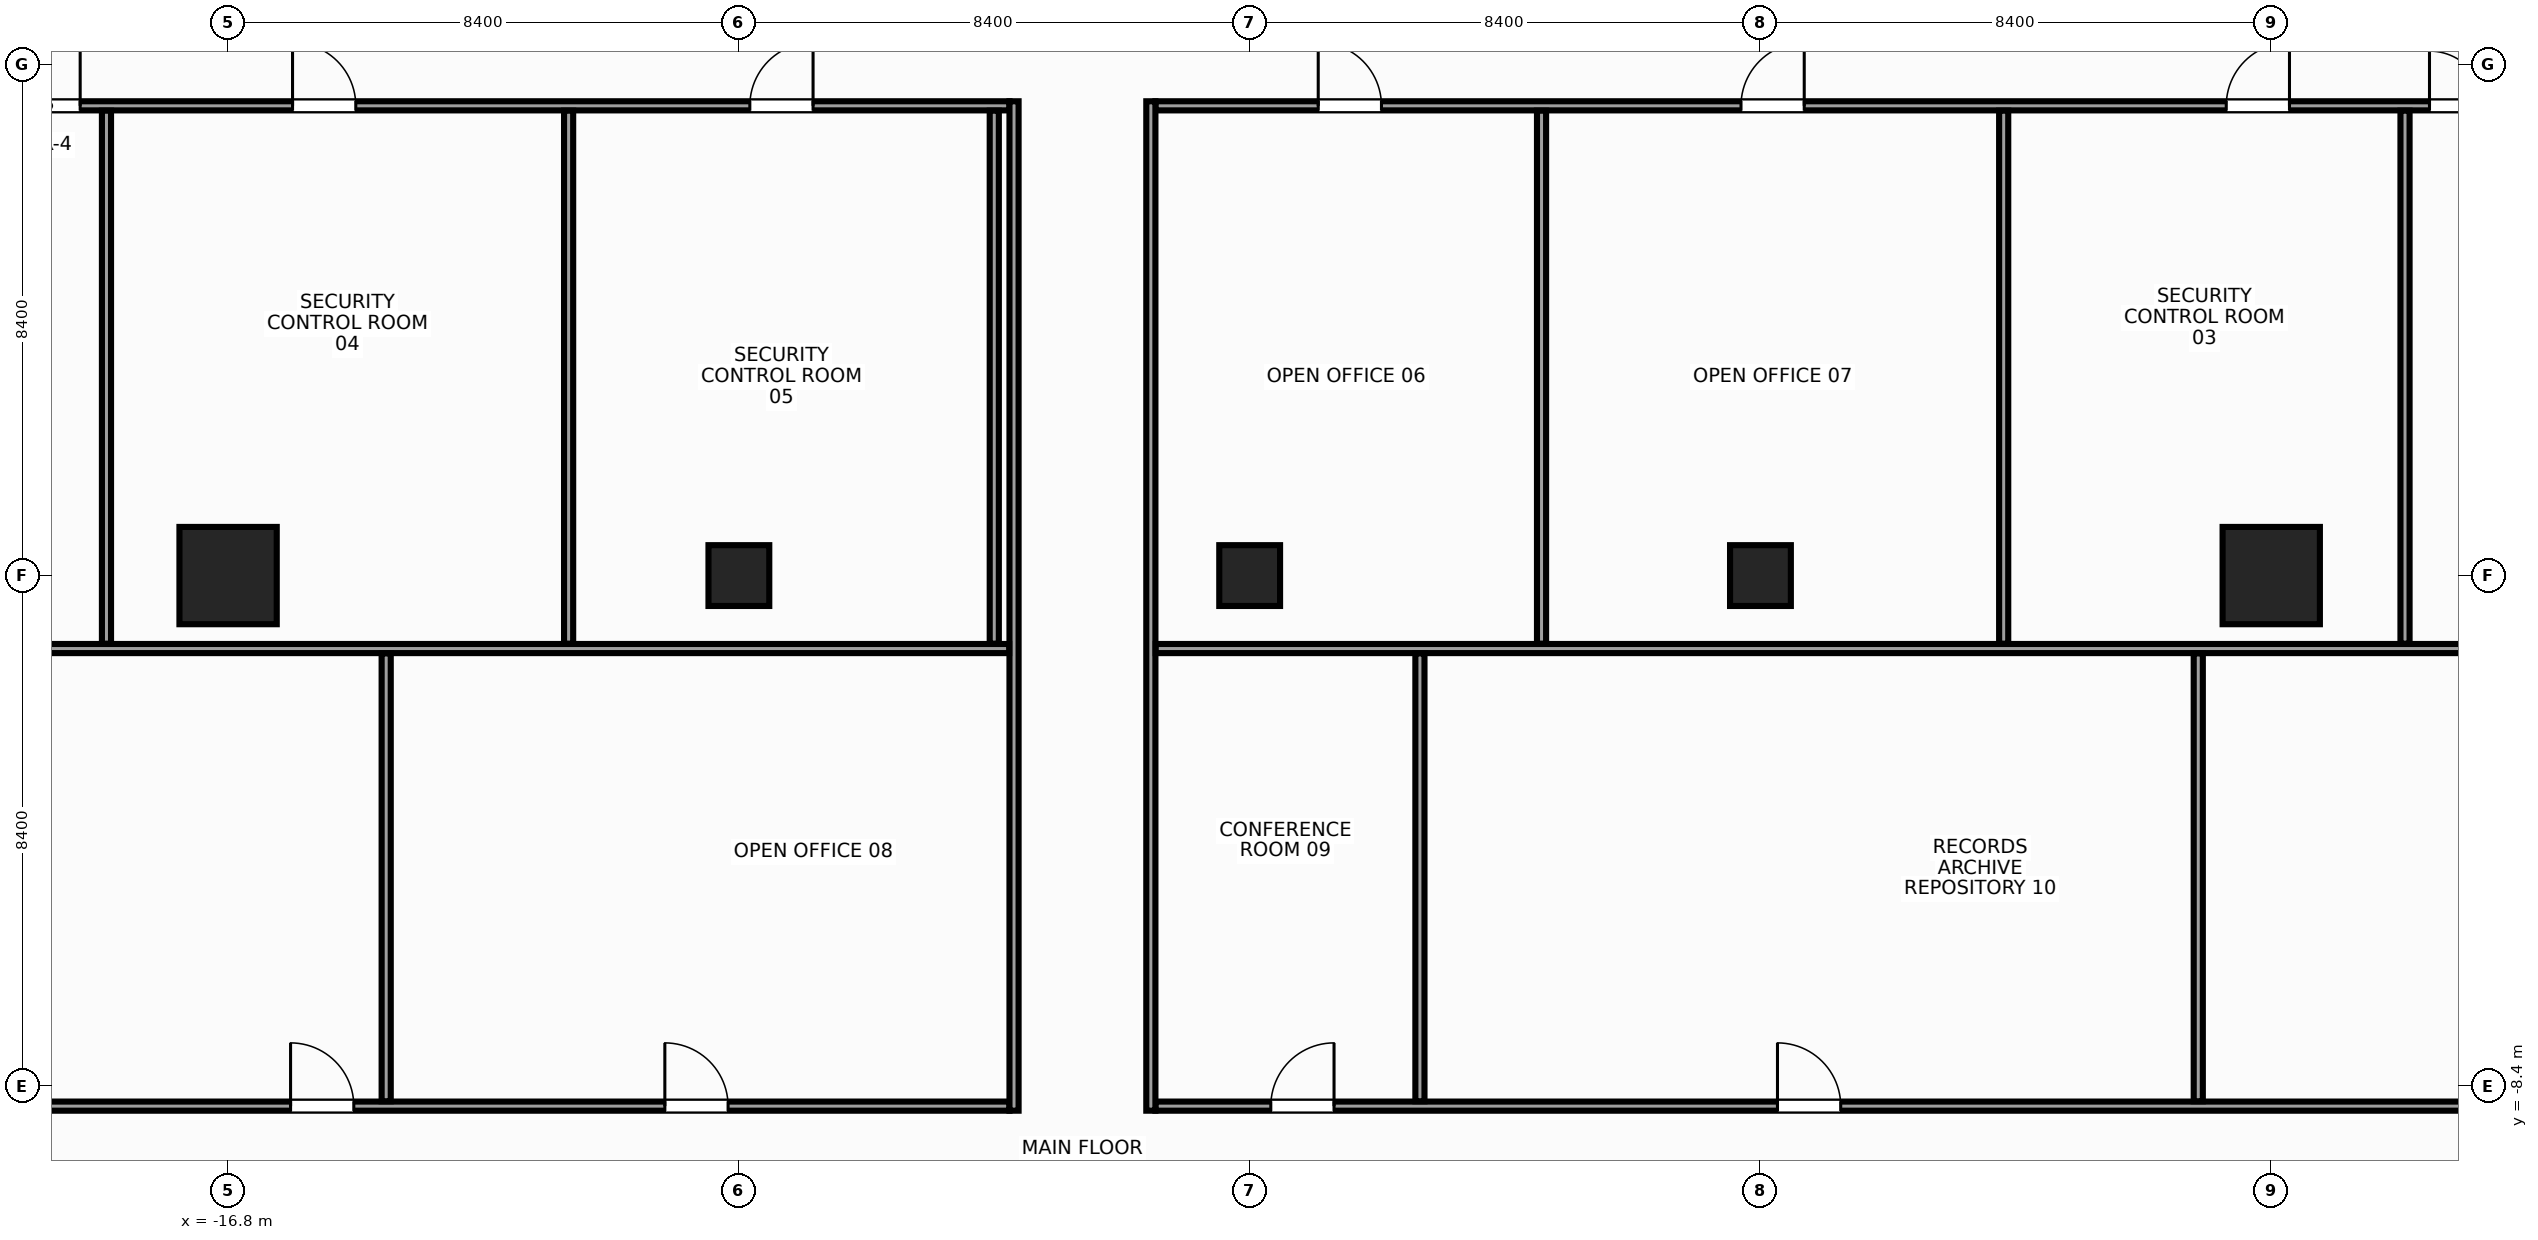
"""IFC4 building model, lengths in metres.
Left out: names, types, materials, properties, quantities, classifications, styles, units other than length and angle.
Written with IfcOpenShell. Run it as: python <this file> out.ifc"""

import sys

from ifc_helpers import new_model, si_unit, direction, frame, frame_2d, origin, origin_with_axes, origin_2d, place, context, subcontext, project, spatial, rectangle, hollow_rectangle, extrude, source, transform, mapped, element, fill, save


model = new_model("IFC4")
c1 = context("Model", 3, precision=1e-05, world=origin(), true_north=direction((0.0, 1.0)))
c2 = subcontext(c1, "Body", "Model", "MODEL_VIEW")
j1 = project(units=[si_unit("LENGTHUNIT", "METRE"), si_unit("PLANEANGLEUNIT", "RADIAN")], contexts=[c1])
p1 = place(None, origin())
s1 = spatial("IfcSite", under=j1, at=p1, CompositionType="ELEMENT")
p2 = place(p1, origin())
s2 = spatial("IfcBuilding", under=s1, at=p2, CompositionType="ELEMENT")
p3 = place(p2, frame((0.0, 0.0, 92.0)))
s3 = spatial("IfcBuildingStorey", under=s2, at=p3, CompositionType="ELEMENT", Elevation=92.0)
m1 = source(origin(), c2, "Body", "SweptSolid", [
    extrude(rectangle(XDim=1.6, YDim=1.6, at=origin_2d()), origin(), (0.0, 0.0, 1.0), 3.6),
])
for number, where, z_axis, x_axis in (
    (1, (-16.8, 0.0, 0.0), (0.0, 0.0, 1.0), (1.0, 0.0, 0.0)),
    (2, (16.8, 0.0, 0.0), (0.0, 0.0, 1.0), (1.0, 0.0, 0.0)),
):
    element("IfcColumn", number, at=place(p3, frame(where, z_axis=z_axis, x_axis=x_axis)), inside=s3, PredefinedType="COLUMN", context=c2, shape_type="MappedRepresentation", body=[
        mapped(m1, transform((0.0, 0.0, 0.0), x_axis=(1.0, 0.0, 0.0), y_axis=(0.0, 1.0, 0.0), z_axis=(0.0, 0.0, 1.0), scale=1.0)),
    ])
m2 = source(origin(), c2, "Body", "SweptSolid", [
    extrude(hollow_rectangle(XDim=1.0, YDim=1.0, WallThickness=0.045, at=origin_2d()), origin(), (0.0, 0.0, 1.0), 3.6),
])
for number, where, z_axis, x_axis in (
    (3, (-8.4, 0.0, 0.0), (0.0, 0.0, 1.0), (1.0, 0.0, 0.0)),
    (4, (8.4, 0.0, 0.0), (0.0, 0.0, 1.0), (1.0, 0.0, 0.0)),
):
    element("IfcColumn", number, at=place(p3, frame(where, z_axis=z_axis, x_axis=x_axis)), inside=s3, PredefinedType="COLUMN", context=c2, shape_type="MappedRepresentation", body=[
        mapped(m2, transform((0.0, 0.0, 0.0), x_axis=(1.0, 0.0, 0.0), y_axis=(0.0, 1.0, 0.0), z_axis=(0.0, 0.0, 1.0), scale=1.0)),
    ])
m3 = source(origin(), c2, "Body", "SweptSolid", [
    extrude(rectangle(XDim=1.0, YDim=1.0, at=origin_2d()), origin(), (0.0, 0.0, 1.0), 3.6),
])
p4 = place(p3, origin_with_axes())
e5 = element("IfcColumn", 5, at=p4, inside=s3, PredefinedType="COLUMN", context=c2, shape_type="MappedRepresentation", body=[
    mapped(m3, transform((0.0, 0.0, 0.0), x_axis=(1.0, 0.0, 0.0), y_axis=(0.0, 1.0, 0.0), z_axis=(0.0, 0.0, 1.0), scale=1.0)),
])
m4 = source(origin(), c2, "Body", "SweptSolid", [
    extrude(rectangle(XDim=16.8, YDim=0.15, at=frame_2d((8.4, 0.0))), origin(), (0.0, 0.0, 1.0), 2.745),
])
p5 = place(p3, frame((-20.75, 7.725, 0.0), z_axis=(0.0, 0.0, 1.0), x_axis=(1.0, 0.0, 0.0)))
e6 = element("IfcWall", 6, at=p5, inside=s3, PredefinedType="PARTITIONING", context=c2, shape_type="MappedRepresentation", body=[
    mapped(m4, transform((0.0, 0.0, 0.0), x_axis=(1.0, 0.0, 0.0), y_axis=(0.0, 1.0, 0.0), z_axis=(0.0, 0.0, 1.0), scale=1.0)),
])
p6 = place(p5, frame((0.478, 0.0, 0.0)))
e7 = element("IfcOpeningElement", 7, at=p6, cuts=e6, PredefinedType="OPENING", context=c2, shape_type="SweptSolid", body=[
    extrude(rectangle(XDim=1.04, YDim=2.2, at=frame_2d((0.52, 1.1))), frame((0.0, 0.087, 0.0), z_axis=(0.0, -1.0, 0.0), x_axis=(1.0, 0.0, 0.0)), (0.0, 0.0, 1.0), 0.174),
])
p7 = place(p5, frame((5.01, 0.0, 0.0)))
e8 = element("IfcOpeningElement", 8, at=p7, cuts=e6, PredefinedType="OPENING", context=c2, shape_type="SweptSolid", body=[
    extrude(rectangle(XDim=1.04, YDim=2.2, at=frame_2d((0.52, 1.1))), frame((0.0, 0.087, 0.0), z_axis=(0.0, -1.0, 0.0), x_axis=(1.0, 0.0, 0.0)), (0.0, 0.0, 1.0), 0.174),
])
p8 = place(p5, frame((12.53, 0.0, 0.0)))
e9 = element("IfcOpeningElement", 9, at=p8, cuts=e6, PredefinedType="OPENING", context=c2, shape_type="SweptSolid", body=[
    extrude(rectangle(XDim=1.04, YDim=2.2, at=frame_2d((0.52, 1.1))), frame((0.0, 0.087, 0.0), z_axis=(0.0, -1.0, 0.0), x_axis=(1.0, 0.0, 0.0)), (0.0, 0.0, 1.0), 0.174),
])
m5 = source(origin(), c2, "Body", "SweptSolid", [
    extrude(rectangle(XDim=22.3, YDim=0.15, at=frame_2d((11.15, 0.0))), origin(), (0.0, 0.0, 1.0), 2.745),
])
p9 = place(p3, frame((-1.55, 7.725, 0.0), z_axis=(0.0, 0.0, 1.0), x_axis=(1.0, 0.0, 0.0)))
e10 = element("IfcWall", 10, at=p9, inside=s3, PredefinedType="PARTITIONING", context=c2, shape_type="MappedRepresentation", body=[
    mapped(m5, transform((0.0, 0.0, 0.0), x_axis=(1.0, 0.0, 0.0), y_axis=(0.0, 1.0, 0.0), z_axis=(0.0, 0.0, 1.0), scale=1.0)),
])
p10 = place(p9, frame((20.952, 0.0, 0.0)))
e11 = element("IfcOpeningElement", 11, at=p10, cuts=e10, PredefinedType="OPENING", context=c2, shape_type="SweptSolid", body=[
    extrude(rectangle(XDim=0.9, YDim=2.15, at=frame_2d((0.45, 1.075))), frame((0.0, 0.087, 0.0), z_axis=(0.0, -1.0, 0.0), x_axis=(1.0, 0.0, 0.0)), (0.0, 0.0, 1.0), 0.174),
])
p11 = place(p9, frame((17.61, 0.0, 0.0)))
e12 = element("IfcOpeningElement", 12, at=p11, cuts=e10, PredefinedType="OPENING", context=c2, shape_type="SweptSolid", body=[
    extrude(rectangle(XDim=1.04, YDim=2.2, at=frame_2d((0.52, 1.1))), frame((0.0, 0.087, 0.0), z_axis=(0.0, -1.0, 0.0), x_axis=(1.0, 0.0, 0.0)), (0.0, 0.0, 1.0), 0.174),
])
p12 = place(p9, frame((2.677, 0.0, 0.0)))
e13 = element("IfcOpeningElement", 13, at=p12, cuts=e10, PredefinedType="OPENING", context=c2, shape_type="SweptSolid", body=[
    extrude(rectangle(XDim=1.04, YDim=2.2, at=frame_2d((0.52, 1.1))), frame((0.0, 0.087, 0.0), z_axis=(0.0, -1.0, 0.0), x_axis=(1.0, 0.0, 0.0)), (0.0, 0.0, 1.0), 0.174),
])
p13 = place(p9, frame((9.63, 0.0, 0.0)))
e14 = element("IfcOpeningElement", 14, at=p13, cuts=e10, PredefinedType="OPENING", context=c2, shape_type="SweptSolid", body=[
    extrude(rectangle(XDim=1.04, YDim=2.2, at=frame_2d((0.52, 1.1))), frame((0.0, 0.087, 0.0), z_axis=(0.0, -1.0, 0.0), x_axis=(1.0, 0.0, 0.0)), (0.0, 0.0, 1.0), 0.174),
])
p14 = place(p3, frame((-20.75, -8.725, 0.0), z_axis=(0.0, 0.0, 1.0), x_axis=(1.0, 0.0, 0.0)))
e15 = element("IfcWall", 15, at=p14, inside=s3, PredefinedType="PARTITIONING", context=c2, shape_type="MappedRepresentation", body=[
    mapped(m4, transform((0.0, 0.0, 0.0), x_axis=(1.0, 0.0, 0.0), y_axis=(0.0, 1.0, 0.0), z_axis=(0.0, 0.0, 1.0), scale=1.0)),
])
p15 = place(p14, frame((11.133, 0.0, 0.0)))
e16 = element("IfcOpeningElement", 16, at=p15, cuts=e15, PredefinedType="OPENING", context=c2, shape_type="SweptSolid", body=[
    extrude(rectangle(XDim=1.04, YDim=2.2, at=frame_2d((0.52, 1.1))), frame((0.0, 0.087, 0.0), z_axis=(0.0, -1.0, 0.0), x_axis=(1.0, 0.0, 0.0)), (0.0, 0.0, 1.0), 0.174),
])
p16 = place(p14, frame((4.978, 0.0, 0.0)))
e17 = element("IfcOpeningElement", 17, at=p16, cuts=e15, PredefinedType="OPENING", context=c2, shape_type="SweptSolid", body=[
    extrude(rectangle(XDim=1.04, YDim=2.2, at=frame_2d((0.52, 1.1))), frame((0.0, 0.087, 0.0), z_axis=(0.0, -1.0, 0.0), x_axis=(1.0, 0.0, 0.0)), (0.0, 0.0, 1.0), 0.174),
])
p17 = place(p3, frame((-1.55, -8.725, 0.0), z_axis=(0.0, 0.0, 1.0), x_axis=(1.0, 0.0, 0.0)))
e18 = element("IfcWall", 18, at=p17, inside=s3, PredefinedType="PARTITIONING", context=c2, shape_type="MappedRepresentation", body=[
    mapped(m5, transform((0.0, 0.0, 0.0), x_axis=(1.0, 0.0, 0.0), y_axis=(0.0, 1.0, 0.0), z_axis=(0.0, 0.0, 1.0), scale=1.0)),
])
p18 = place(p17, frame((1.897, 0.0, 0.0)))
e19 = element("IfcOpeningElement", 19, at=p18, cuts=e18, PredefinedType="OPENING", context=c2, shape_type="SweptSolid", body=[
    extrude(rectangle(XDim=1.04, YDim=2.2, at=frame_2d((0.52, 1.1))), frame((0.0, 0.087, 0.0), z_axis=(0.0, -1.0, 0.0), x_axis=(1.0, 0.0, 0.0)), (0.0, 0.0, 1.0), 0.174),
])
p19 = place(p17, frame((10.23, 0.0, 0.0)))
e20 = element("IfcOpeningElement", 20, at=p19, cuts=e18, PredefinedType="OPENING", context=c2, shape_type="SweptSolid", body=[
    extrude(rectangle(XDim=1.04, YDim=2.2, at=frame_2d((0.52, 1.1))), frame((0.0, 0.087, 0.0), z_axis=(0.0, -1.0, 0.0), x_axis=(1.0, 0.0, 0.0)), (0.0, 0.0, 1.0), 0.174),
])
m6 = source(origin(), c2, "Body", "SweptSolid", [
    extrude(rectangle(XDim=16.6, YDim=0.15, at=frame_2d((8.3, 0.0))), origin(), (0.0, 0.0, 1.0), 2.645),
])
for number, where, z_axis, x_axis in (
    (21, (-3.875, -8.8, 0.0), (0.0, 0.0, 1.0), (0.0, 1.0, 0.0)),
    (22, (-1.625, -8.8, 0.0), (0.0, 0.0, 1.0), (0.0, 1.0, 0.0)),
):
    element("IfcWall", number, at=place(p3, frame(where, z_axis=z_axis, x_axis=x_axis)), inside=s3, PredefinedType="PARTITIONING", context=c2, shape_type="MappedRepresentation", body=[
        mapped(m6, transform((0.0, 0.0, 0.0), x_axis=(1.0, 0.0, 0.0), y_axis=(0.0, 1.0, 0.0), z_axis=(0.0, 0.0, 1.0), scale=1.0)),
    ])
m7 = source(origin(), c2, "Body", "SweptSolid", [
    extrude(rectangle(XDim=21.395, YDim=0.15, at=frame_2d((10.698, 0.0))), origin(), (0.0, 0.0, 1.0), 2.745),
])
p20 = place(p3, frame((-25.35, -1.2, 0.0), z_axis=(0.0, 0.0, 1.0), x_axis=(1.0, 0.0, 0.0)))
e23 = element("IfcWall", 23, at=p20, inside=s3, PredefinedType="PARTITIONING", context=c2, shape_type="MappedRepresentation", body=[
    mapped(m7, transform((0.0, 0.0, 0.0), x_axis=(1.0, 0.0, 0.0), y_axis=(0.0, 1.0, 0.0), z_axis=(0.0, 0.0, 1.0), scale=1.0)),
])
m8 = source(origin(), c2, "Body", "SweptSolid", [
    extrude(rectangle(XDim=26.895, YDim=0.15, at=frame_2d((13.448, 0.0))), origin(), (0.0, 0.0, 1.0), 2.745),
])
p21 = place(p3, frame((-1.545, -1.2, 0.0), z_axis=(0.0, 0.0, 1.0), x_axis=(1.0, 0.0, 0.0)))
e24 = element("IfcWall", 24, at=p21, inside=s3, PredefinedType="PARTITIONING", context=c2, shape_type="MappedRepresentation", body=[
    mapped(m8, transform((0.0, 0.0, 0.0), x_axis=(1.0, 0.0, 0.0), y_axis=(0.0, 1.0, 0.0), z_axis=(0.0, 0.0, 1.0), scale=1.0)),
])
m9 = source(origin(), c2, "Body", "SweptSolid", [
    extrude(rectangle(XDim=8.765, YDim=0.15, at=frame_2d((4.383, 0.0))), origin(), (0.0, 0.0, 1.0), 2.745),
])
p22 = place(p3, frame((-18.8, -1.12, 0.0), z_axis=(0.0, 0.0, 1.0), x_axis=(0.0, 1.0, 0.0)))
e25 = element("IfcWall", 25, at=p22, inside=s3, PredefinedType="PARTITIONING", context=c2, shape_type="MappedRepresentation", body=[
    mapped(m9, transform((0.0, 0.0, 0.0), x_axis=(1.0, 0.0, 0.0), y_axis=(0.0, 1.0, 0.0), z_axis=(0.0, 0.0, 1.0), scale=1.0)),
])
m10 = source(origin(), c2, "Body", "SweptSolid", [
    extrude(rectangle(XDim=8.765, YDim=0.15, at=frame_2d((4.383, 0.0))), origin(), (0.0, 0.0, 1.0), 2.645),
])
for number, where, z_axis, x_axis in (
    (26, (-11.2, -1.12, 0.0), (0.0, 0.0, 1.0), (0.0, 1.0, 0.0)),
    (27, (-4.2, -1.12, 0.0), (0.0, 0.0, 1.0), (0.0, 1.0, 0.0)),
    (28, (4.8, -1.12, 0.0), (0.0, 0.0, 1.0), (0.0, 1.0, 0.0)),
    (29, (12.4, -1.12, 0.0), (0.0, 0.0, 1.0), (0.0, 1.0, 0.0)),
):
    element("IfcWall", number, at=place(p3, frame(where, z_axis=z_axis, x_axis=x_axis)), inside=s3, PredefinedType="PARTITIONING", context=c2, shape_type="MappedRepresentation", body=[
        mapped(m10, transform((0.0, 0.0, 0.0), x_axis=(1.0, 0.0, 0.0), y_axis=(0.0, 1.0, 0.0), z_axis=(0.0, 0.0, 1.0), scale=1.0)),
    ])
p23 = place(p3, frame((19.0, -1.12, 0.0), z_axis=(0.0, 0.0, 1.0), x_axis=(0.0, 1.0, 0.0)))
e30 = element("IfcWall", 30, at=p23, inside=s3, PredefinedType="PARTITIONING", context=c2, shape_type="MappedRepresentation", body=[
    mapped(m9, transform((0.0, 0.0, 0.0), x_axis=(1.0, 0.0, 0.0), y_axis=(0.0, 1.0, 0.0), z_axis=(0.0, 0.0, 1.0), scale=1.0)),
])
m11 = source(origin(), c2, "Body", "SweptSolid", [
    extrude(rectangle(XDim=7.365, YDim=0.15, at=frame_2d((3.683, 0.0))), origin(), (0.0, 0.0, 1.0), 3.36),
])
for number, where, z_axis, x_axis in (
    (31, (-14.2, -8.645, 0.0), (0.0, 0.0, 1.0), (0.0, 1.0, 0.0)),
    (32, (2.8, -8.645, 0.0), (0.0, 0.0, 1.0), (0.0, 1.0, 0.0)),
    (33, (15.6, -8.645, 0.0), (0.0, 0.0, 1.0), (0.0, 1.0, 0.0)),
):
    element("IfcWall", number, at=place(p3, frame(where, z_axis=z_axis, x_axis=x_axis)), inside=s3, PredefinedType="PARTITIONING", context=c2, shape_type="MappedRepresentation", body=[
        mapped(m11, transform((0.0, 0.0, 0.0), x_axis=(1.0, 0.0, 0.0), y_axis=(0.0, 1.0, 0.0), z_axis=(0.0, 0.0, 1.0), scale=1.0)),
    ])
m12 = source(origin(), c2, "Body", "SweptSolid", [
    extrude(rectangle(XDim=1.04, YDim=2.2, at=frame_2d((0.52, 1.1))), frame((0.0, 0.025, 0.0), z_axis=(0.0, -1.0, 0.0), x_axis=(1.0, 0.0, 0.0)), (0.0, 0.0, 1.0), 0.05),
])
p24 = place(p6, origin())
e34 = element("IfcDoor", 34, at=p24, inside=s3, OperationType="SINGLE_SWING_RIGHT", PredefinedType="DOOR", context=c2, shape_type="MappedRepresentation", body=[
    mapped(m12, transform((0.0, 0.0, 0.0), x_axis=(1.0, 0.0, 0.0), y_axis=(0.0, 1.0, 0.0), z_axis=(0.0, 0.0, 1.0), scale=1.0)),
])
fill(e7, e34)
m13 = source(origin(), c2, "Body", "SweptSolid", [
    extrude(rectangle(XDim=0.9, YDim=2.15, at=frame_2d((0.45, 1.075))), frame((0.0, 0.025, 0.0), z_axis=(0.0, -1.0, 0.0), x_axis=(1.0, 0.0, 0.0)), (0.0, 0.0, 1.0), 0.05),
])
p25 = place(p10, origin())
e35 = element("IfcDoor", 35, at=p25, inside=s3, OperationType="SINGLE_SWING_LEFT", PredefinedType="DOOR", context=c2, shape_type="MappedRepresentation", body=[
    mapped(m13, transform((0.0, 0.0, 0.0), x_axis=(1.0, 0.0, 0.0), y_axis=(0.0, 1.0, 0.0), z_axis=(0.0, 0.0, 1.0), scale=1.0)),
])
fill(e11, e35)
p26 = place(p11, origin())
e36 = element("IfcDoor", 36, at=p26, inside=s3, OperationType="SINGLE_SWING_RIGHT", PredefinedType="DOOR", context=c2, shape_type="MappedRepresentation", body=[
    mapped(m12, transform((0.0, 0.0, 0.0), x_axis=(1.0, 0.0, 0.0), y_axis=(0.0, 1.0, 0.0), z_axis=(0.0, 0.0, 1.0), scale=1.0)),
])
fill(e12, e36)
p27 = place(p7, origin())
e37 = element("IfcDoor", 37, at=p27, inside=s3, OperationType="SINGLE_SWING_LEFT", PredefinedType="DOOR", context=c2, shape_type="MappedRepresentation", body=[
    mapped(m12, transform((0.0, 0.0, 0.0), x_axis=(1.0, 0.0, 0.0), y_axis=(0.0, 1.0, 0.0), z_axis=(0.0, 0.0, 1.0), scale=1.0)),
])
fill(e8, e37)
p28 = place(p8, origin())
e38 = element("IfcDoor", 38, at=p28, inside=s3, OperationType="SINGLE_SWING_RIGHT", PredefinedType="DOOR", context=c2, shape_type="MappedRepresentation", body=[
    mapped(m12, transform((0.0, 0.0, 0.0), x_axis=(1.0, 0.0, 0.0), y_axis=(0.0, 1.0, 0.0), z_axis=(0.0, 0.0, 1.0), scale=1.0)),
])
fill(e9, e38)
p29 = place(p12, origin())
e39 = element("IfcDoor", 39, at=p29, inside=s3, OperationType="SINGLE_SWING_LEFT", PredefinedType="DOOR", context=c2, shape_type="MappedRepresentation", body=[
    mapped(m12, transform((0.0, 0.0, 0.0), x_axis=(1.0, 0.0, 0.0), y_axis=(0.0, 1.0, 0.0), z_axis=(0.0, 0.0, 1.0), scale=1.0)),
])
fill(e13, e39)
p30 = place(p13, origin())
e40 = element("IfcDoor", 40, at=p30, inside=s3, OperationType="SINGLE_SWING_RIGHT", PredefinedType="DOOR", context=c2, shape_type="MappedRepresentation", body=[
    mapped(m12, transform((0.0, 0.0, 0.0), x_axis=(1.0, 0.0, 0.0), y_axis=(0.0, 1.0, 0.0), z_axis=(0.0, 0.0, 1.0), scale=1.0)),
])
fill(e14, e40)
p31 = place(p15, origin())
e41 = element("IfcDoor", 41, at=p31, inside=s3, OperationType="SINGLE_SWING_LEFT", PredefinedType="DOOR", context=c2, shape_type="MappedRepresentation", body=[
    mapped(m12, transform((0.0, 0.0, 0.0), x_axis=(1.0, 0.0, 0.0), y_axis=(0.0, 1.0, 0.0), z_axis=(0.0, 0.0, 1.0), scale=1.0)),
])
fill(e16, e41)
p32 = place(p18, origin())
e42 = element("IfcDoor", 42, at=p32, inside=s3, OperationType="SINGLE_SWING_RIGHT", PredefinedType="DOOR", context=c2, shape_type="MappedRepresentation", body=[
    mapped(m12, transform((0.0, 0.0, 0.0), x_axis=(1.0, 0.0, 0.0), y_axis=(0.0, 1.0, 0.0), z_axis=(0.0, 0.0, 1.0), scale=1.0)),
])
fill(e19, e42)
p33 = place(p19, origin())
e43 = element("IfcDoor", 43, at=p33, inside=s3, OperationType="SINGLE_SWING_LEFT", PredefinedType="DOOR", context=c2, shape_type="MappedRepresentation", body=[
    mapped(m12, transform((0.0, 0.0, 0.0), x_axis=(1.0, 0.0, 0.0), y_axis=(0.0, 1.0, 0.0), z_axis=(0.0, 0.0, 1.0), scale=1.0)),
])
fill(e20, e43)
p34 = place(p16, origin())
e44 = element("IfcDoor", 44, at=p34, inside=s3, OperationType="SINGLE_SWING_LEFT", PredefinedType="DOOR", context=c2, shape_type="MappedRepresentation", body=[
    mapped(m12, transform((0.0, 0.0, 0.0), x_axis=(1.0, 0.0, 0.0), y_axis=(0.0, 1.0, 0.0), z_axis=(0.0, 0.0, 1.0), scale=1.0)),
])
fill(e17, e44)
save(model, sys.argv[1])
